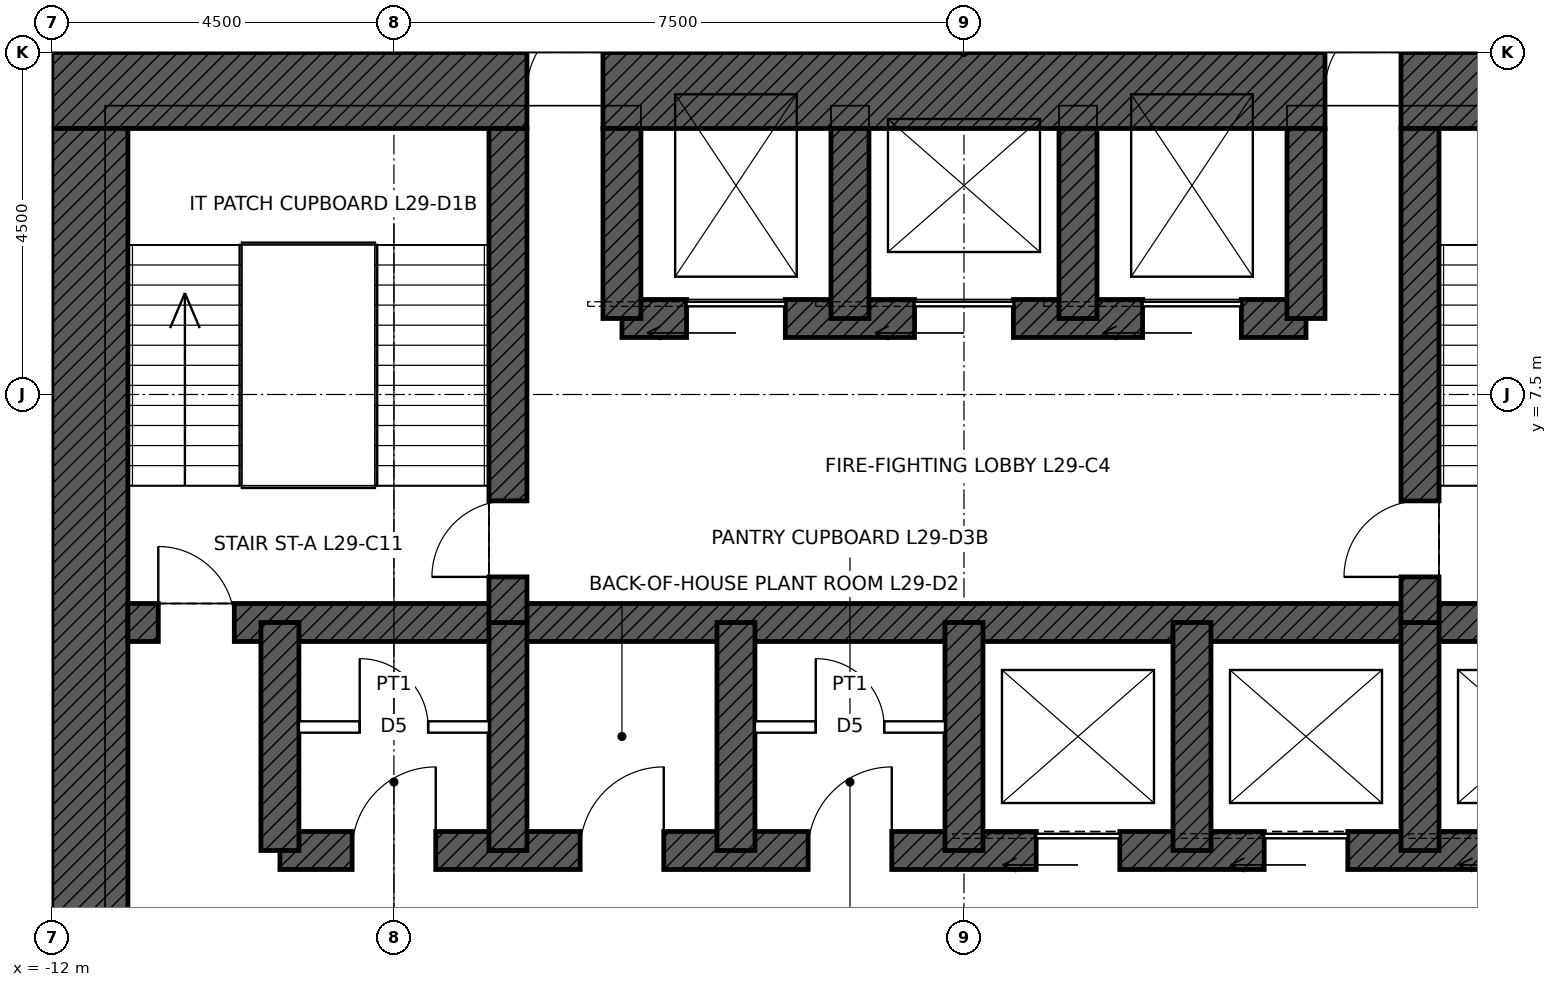
"""IFC4 building model, lengths in metres.
Left out: names, types, materials, properties, quantities, classifications, styles, units other than length and angle.
Written with IfcOpenShell. Run it as: python <this file> out.ifc"""

import sys

from ifc_helpers import new_model, si_unit, direction, frame, frame_2d, origin, place, context, subcontext, project, spatial, rectangle, extrude, element, fill, save


model = new_model("IFC4")
c1 = context("Model", 3, precision=1e-05, world=origin(), true_north=direction((0.0, 1.0)))
c2 = subcontext(c1, "Body", "Model", "MODEL_VIEW")
j1 = project(units=[si_unit("LENGTHUNIT", "METRE"), si_unit("PLANEANGLEUNIT", "RADIAN")], contexts=[c1])
p1 = place(None, origin())
s1 = spatial("IfcSite", under=j1, at=p1, CompositionType="ELEMENT")
p2 = place(p1, origin())
s2 = spatial("IfcBuilding", under=s1, at=p2, CompositionType="ELEMENT")
p3 = place(p2, frame((0.0, 0.0, 144.9)))
s3 = spatial("IfcBuildingStorey", under=s2, at=p3, CompositionType="ELEMENT", Elevation=144.9)
p4 = place(p3, frame((-12.0, 11.5, 0.0), z_axis=(0.0, 0.0, 1.0), x_axis=(1.0, 0.0, 0.0)))
e1 = element("IfcWall", 1, at=p4, inside=s3, PredefinedType="SHEAR", context=c2, shape_type="SweptSolid", body=[
    extrude(rectangle(XDim=24.0, YDim=1.0, at=frame_2d((12.0, 0.0))), origin(), (0.0, 0.0, 1.0), 4.5),
])
p5 = place(p4, frame((6.25, 0.0, 0.0)))
e2 = element("IfcOpeningElement", 2, at=p5, cuts=e1, PredefinedType="OPENING", context=c2, shape_type="SweptSolid", body=[
    extrude(rectangle(XDim=1.0, YDim=2.4, at=frame_2d((0.5, 1.2))), frame((0.0, 0.51, 0.0), z_axis=(0.0, -1.0, 0.0), x_axis=(1.0, 0.0, 0.0)), (0.0, 0.0, 1.0), 1.02),
])
p6 = place(p4, frame((16.75, 0.0, 0.0)))
e3 = element("IfcOpeningElement", 3, at=p6, cuts=e1, PredefinedType="OPENING", context=c2, shape_type="SweptSolid", body=[
    extrude(rectangle(XDim=1.0, YDim=2.4, at=frame_2d((0.5, 1.2))), frame((0.0, 0.51, 0.0), z_axis=(0.0, -1.0, 0.0), x_axis=(1.0, 0.0, 0.0)), (0.0, 0.0, 1.0), 1.02),
])
p7 = place(p3, frame((-11.5, -11.0, 0.0), z_axis=(0.0, 0.0, 1.0), x_axis=(0.0, 1.0, 0.0)))
e4 = element("IfcWall", 4, at=p7, inside=s3, PredefinedType="SHEAR", context=c2, shape_type="SweptSolid", body=[
    extrude(rectangle(XDim=22.0, YDim=1.0, at=frame_2d((11.0, 0.0))), origin(), (0.0, 0.0, 1.0), 4.5),
])
p8 = place(p7, frame((10.5, 0.0, 0.0)))
e5 = element("IfcOpeningElement", 5, at=p8, cuts=e4, PredefinedType="OPENING", context=c2, shape_type="SweptSolid", body=[
    extrude(rectangle(XDim=1.0, YDim=2.4, at=frame_2d((0.5, 1.2))), frame((0.0, 0.51, 0.0), z_axis=(0.0, -1.0, 0.0), x_axis=(1.0, 0.0, 0.0)), (0.0, 0.0, 1.0), 1.02),
])
p9 = place(p3, frame((-11.0, 4.5, 0.0), z_axis=(0.0, 0.0, 1.0), x_axis=(1.0, 0.0, 0.0)))
e6 = element("IfcWall", 6, at=p9, inside=s3, PredefinedType="SHEAR", context=c2, shape_type="SweptSolid", body=[
    extrude(rectangle(XDim=22.0, YDim=0.5, at=frame_2d((11.0, 0.0))), origin(), (0.0, 0.0, 1.0), 4.5),
])
p10 = place(p9, frame((0.4, 0.0, 0.0)))
e7 = element("IfcOpeningElement", 7, at=p10, cuts=e6, PredefinedType="OPENING", context=c2, shape_type="SweptSolid", body=[
    extrude(rectangle(XDim=1.0, YDim=2.1, at=frame_2d((0.5, 1.05))), frame((0.0, 0.26, 0.0), z_axis=(0.0, -1.0, 0.0), x_axis=(1.0, 0.0, 0.0)), (0.0, 0.0, 1.0), 0.52),
])
p11 = place(p9, frame((20.6, 0.0, 0.0)))
e8 = element("IfcOpeningElement", 8, at=p11, cuts=e6, PredefinedType="OPENING", context=c2, shape_type="SweptSolid", body=[
    extrude(rectangle(XDim=1.0, YDim=2.1, at=frame_2d((0.5, 1.05))), frame((0.0, 0.26, 0.0), z_axis=(0.0, -1.0, 0.0), x_axis=(1.0, 0.0, 0.0)), (0.0, 0.0, 1.0), 0.52),
])
p12 = place(p3, frame((-9.0, 1.5, 0.0), z_axis=(0.0, 0.0, 1.0), x_axis=(1.0, 0.0, 0.0)))
e9 = element("IfcWall", 9, at=p12, inside=s3, PredefinedType="SHEAR", context=c2, shape_type="SweptSolid", body=[
    extrude(rectangle(XDim=18.0, YDim=0.5, at=frame_2d((9.0, 0.0))), origin(), (0.0, 0.0, 1.0), 4.5),
])
p13 = place(p12, frame((9.95, 0.0, 0.0)))
e10 = element("IfcOpeningElement", 10, at=p13, cuts=e9, PredefinedType="OPENING", context=c2, shape_type="SweptSolid", body=[
    extrude(rectangle(XDim=1.1, YDim=2.1, at=frame_2d((0.55, 1.05))), frame((0.0, 0.26, 0.0), z_axis=(0.0, -1.0, 0.0), x_axis=(1.0, 0.0, 0.0)), (0.0, 0.0, 1.0), 0.52),
])
p14 = place(p12, frame((12.95, 0.0, 0.0)))
e11 = element("IfcOpeningElement", 11, at=p14, cuts=e9, PredefinedType="OPENING", context=c2, shape_type="SweptSolid", body=[
    extrude(rectangle(XDim=1.1, YDim=2.1, at=frame_2d((0.55, 1.05))), frame((0.0, 0.26, 0.0), z_axis=(0.0, -1.0, 0.0), x_axis=(1.0, 0.0, 0.0)), (0.0, 0.0, 1.0), 0.52),
])
p15 = place(p12, frame((15.95, 0.0, 0.0)))
e12 = element("IfcOpeningElement", 12, at=p15, cuts=e9, PredefinedType="OPENING", context=c2, shape_type="SweptSolid", body=[
    extrude(rectangle(XDim=1.1, YDim=2.1, at=frame_2d((0.55, 1.05))), frame((0.0, 0.26, 0.0), z_axis=(0.0, -1.0, 0.0), x_axis=(1.0, 0.0, 0.0)), (0.0, 0.0, 1.0), 0.52),
])
p16 = place(p12, frame((0.95, 0.0, 0.0)))
e13 = element("IfcOpeningElement", 13, at=p16, cuts=e9, PredefinedType="OPENING", context=c2, shape_type="SweptSolid", body=[
    extrude(rectangle(XDim=1.1, YDim=2.1, at=frame_2d((0.55, 1.05))), frame((0.0, 0.26, 0.0), z_axis=(0.0, -1.0, 0.0), x_axis=(1.0, 0.0, 0.0)), (0.0, 0.0, 1.0), 0.52),
])
p17 = place(p12, frame((3.95, 0.0, 0.0)))
e14 = element("IfcOpeningElement", 14, at=p17, cuts=e9, PredefinedType="OPENING", context=c2, shape_type="SweptSolid", body=[
    extrude(rectangle(XDim=1.1, YDim=2.1, at=frame_2d((0.55, 1.05))), frame((0.0, 0.26, 0.0), z_axis=(0.0, -1.0, 0.0), x_axis=(1.0, 0.0, 0.0)), (0.0, 0.0, 1.0), 0.52),
])
p18 = place(p12, frame((6.95, 0.0, 0.0)))
e15 = element("IfcOpeningElement", 15, at=p18, cuts=e9, PredefinedType="OPENING", context=c2, shape_type="SweptSolid", body=[
    extrude(rectangle(XDim=1.1, YDim=2.1, at=frame_2d((0.55, 1.05))), frame((0.0, 0.26, 0.0), z_axis=(0.0, -1.0, 0.0), x_axis=(1.0, 0.0, 0.0)), (0.0, 0.0, 1.0), 0.52),
])
p19 = place(p3, frame((-4.5, 8.5, 0.0), z_axis=(0.0, 0.0, 1.0), x_axis=(1.0, 0.0, 0.0)))
e16 = element("IfcWall", 16, at=p19, inside=s3, PredefinedType="SHEAR", context=c2, shape_type="SweptSolid", body=[
    extrude(rectangle(XDim=9.0, YDim=0.5, at=frame_2d((4.5, 0.0))), origin(), (0.0, 0.0, 1.0), 4.5),
])
p20 = place(p19, frame((0.85, 0.0, 0.0)))
e17 = element("IfcOpeningElement", 17, at=p20, cuts=e16, PredefinedType="OPENING", context=c2, shape_type="SweptSolid", body=[
    extrude(rectangle(XDim=1.3, YDim=2.4, at=frame_2d((0.65, 1.2))), frame((0.0, 0.26, 0.0), z_axis=(0.0, -1.0, 0.0), x_axis=(1.0, 0.0, 0.0)), (0.0, 0.0, 1.0), 0.52),
])
p21 = place(p19, frame((6.85, 0.0, 0.0)))
e18 = element("IfcOpeningElement", 18, at=p21, cuts=e16, PredefinedType="OPENING", context=c2, shape_type="SweptSolid", body=[
    extrude(rectangle(XDim=1.3, YDim=2.4, at=frame_2d((0.65, 1.2))), frame((0.0, 0.26, 0.0), z_axis=(0.0, -1.0, 0.0), x_axis=(1.0, 0.0, 0.0)), (0.0, 0.0, 1.0), 0.52),
])
p22 = place(p19, frame((3.85, 0.0, 0.0)))
e19 = element("IfcOpeningElement", 19, at=p22, cuts=e16, PredefinedType="OPENING", context=c2, shape_type="SweptSolid", body=[
    extrude(rectangle(XDim=1.3, YDim=2.4, at=frame_2d((0.65, 1.2))), frame((0.0, 0.26, 0.0), z_axis=(0.0, -1.0, 0.0), x_axis=(1.0, 0.0, 0.0)), (0.0, 0.0, 1.0), 0.52),
])
for number, where, z_axis, x_axis in (
    (20, (-9.0, 1.5, 0.0), (0.0, 0.0, 1.0), (0.0, 1.0, 0.0)),
    (21, (-6.0, 1.5, 0.0), (0.0, 0.0, 1.0), (0.0, 1.0, 0.0)),
    (22, (-3.0, 1.5, 0.0), (0.0, 0.0, 1.0), (0.0, 1.0, 0.0)),
    (23, (0.0, 1.5, 0.0), (0.0, 0.0, 1.0), (0.0, 1.0, 0.0)),
    (24, (3.0, 1.5, 0.0), (0.0, 0.0, 1.0), (0.0, 1.0, 0.0)),
    (25, (6.0, 1.5, 0.0), (0.0, 0.0, 1.0), (0.0, 1.0, 0.0)),
):
    element("IfcWall", number, at=place(p3, frame(where, z_axis=z_axis, x_axis=x_axis)), inside=s3, PredefinedType="SHEAR", context=c2, shape_type="SweptSolid", body=[
        extrude(rectangle(XDim=3.0, YDim=0.5, at=frame_2d((1.5, 0.0))), origin(), (0.0, 0.0, 1.0), 4.5),
    ])
p23 = place(p3, frame((-6.0, 4.5, 0.0), z_axis=(0.0, 0.0, 1.0), x_axis=(0.0, 1.0, 0.0)))
e26 = element("IfcWall", 26, at=p23, inside=s3, PredefinedType="SHEAR", context=c2, shape_type="SweptSolid", body=[
    extrude(rectangle(XDim=6.5, YDim=0.5, at=frame_2d((3.25, 0.0))), origin(), (0.0, 0.0, 1.0), 4.5),
])
p24 = place(p23, frame((0.6, 0.0, 0.0)))
e27 = element("IfcOpeningElement", 27, at=p24, cuts=e26, PredefinedType="OPENING", context=c2, shape_type="SweptSolid", body=[
    extrude(rectangle(XDim=1.0, YDim=2.1, at=frame_2d((0.5, 1.05))), frame((0.0, 0.26, 0.0), z_axis=(0.0, -1.0, 0.0), x_axis=(1.0, 0.0, 0.0)), (0.0, 0.0, 1.0), 0.52),
])
p25 = place(p3, frame((6.0, 4.5, 0.0), z_axis=(0.0, 0.0, 1.0), x_axis=(0.0, 1.0, 0.0)))
e28 = element("IfcWall", 28, at=p25, inside=s3, PredefinedType="SHEAR", context=c2, shape_type="SweptSolid", body=[
    extrude(rectangle(XDim=6.5, YDim=0.5, at=frame_2d((3.25, 0.0))), origin(), (0.0, 0.0, 1.0), 4.5),
])
p26 = place(p25, frame((0.6, 0.0, 0.0)))
e29 = element("IfcOpeningElement", 29, at=p26, cuts=e28, PredefinedType="OPENING", context=c2, shape_type="SweptSolid", body=[
    extrude(rectangle(XDim=1.0, YDim=2.1, at=frame_2d((0.5, 1.05))), frame((0.0, 0.26, 0.0), z_axis=(0.0, -1.0, 0.0), x_axis=(1.0, 0.0, 0.0)), (0.0, 0.0, 1.0), 0.52),
])
for number, where, z_axis, x_axis in (
    (30, (-4.5, 8.5, 0.0), (0.0, 0.0, 1.0), (0.0, 1.0, 0.0)),
    (31, (4.5, 8.5, 0.0), (0.0, 0.0, 1.0), (0.0, 1.0, 0.0)),
    (32, (-1.5, 8.5, 0.0), (0.0, 0.0, 1.0), (0.0, 1.0, 0.0)),
    (33, (1.5, 8.5, 0.0), (0.0, 0.0, 1.0), (0.0, 1.0, 0.0)),
):
    element("IfcWall", number, at=place(p3, frame(where, z_axis=z_axis, x_axis=x_axis)), inside=s3, PredefinedType="SHEAR", context=c2, shape_type="SweptSolid", body=[
        extrude(rectangle(XDim=2.5, YDim=0.5, at=frame_2d((1.25, 0.0))), origin(), (0.0, 0.0, 1.0), 4.5),
    ])
p27 = place(p3, frame((-14.075, 12.0, 0.0), z_axis=(0.0, 0.0, 1.0), x_axis=(1.0, 0.0, 0.0)))
e34 = element("IfcWall", 34, at=p27, inside=s3, PredefinedType="PARTITIONING", context=c2, shape_type="SweptSolid", body=[
    extrude(rectangle(XDim=2.075, YDim=0.15, at=frame_2d((1.038, 0.0))), origin(), (0.0, 0.0, 1.0), 4.3),
])
p28 = place(p27, frame((0.575, 0.0, 0.0)))
e35 = element("IfcOpeningElement", 35, at=p28, cuts=e34, PredefinedType="OPENING", context=c2, shape_type="SweptSolid", body=[
    extrude(rectangle(XDim=1.0, YDim=2.1, at=frame_2d((0.5, 1.05))), frame((0.0, 0.085, 0.0), z_axis=(0.0, -1.0, 0.0), x_axis=(1.0, 0.0, 0.0)), (0.0, 0.0, 1.0), 0.17),
])
p29 = place(p3, frame((-11.25, 12.0, 0.0), z_axis=(0.0, 0.0, 1.0), x_axis=(0.0, 1.0, 0.0)))
e36 = element("IfcWall", 36, at=p29, inside=s3, PredefinedType="PARTITIONING", context=c2, shape_type="SweptSolid", body=[
    extrude(rectangle(XDim=11.55, YDim=0.15, at=frame_2d((5.775, 0.0))), origin(), (0.0, 0.0, 1.0), 3.431),
])
p30 = place(p3, frame((0.0, 12.0, 0.0), z_axis=(0.0, 0.0, 1.0), x_axis=(0.0, 1.0, 0.0)))
e37 = element("IfcWall", 37, at=p30, inside=s3, PredefinedType="PARTITIONING", context=c2, shape_type="SweptSolid", body=[
    extrude(rectangle(XDim=10.39, YDim=0.15, at=frame_2d((5.195, 0.0))), origin(), (0.0, 0.0, 1.0), 3.431),
])
p31 = place(p3, frame((-8.75, 3.125, 0.0), z_axis=(0.0, 0.0, 1.0), x_axis=(1.0, 0.0, 0.0)))
e38 = element("IfcWall", 38, at=p31, inside=s3, PredefinedType="PARTITIONING", context=c2, shape_type="SweptSolid", body=[
    extrude(rectangle(XDim=2.5, YDim=0.15, at=frame_2d((1.25, 0.0))), origin(), (0.0, 0.0, 1.0), 4.25),
])
p32 = place(p31, frame((0.8, 0.0, 0.0)))
e39 = element("IfcOpeningElement", 39, at=p32, cuts=e38, PredefinedType="OPENING", context=c2, shape_type="SweptSolid", body=[
    extrude(rectangle(XDim=0.9, YDim=2.1, at=frame_2d((0.45, 1.05))), frame((0.0, 0.085, 0.0), z_axis=(0.0, -1.0, 0.0), x_axis=(1.0, 0.0, 0.0)), (0.0, 0.0, 1.0), 0.17),
])
p33 = place(p3, frame((-2.75, 3.125, 0.0), z_axis=(0.0, 0.0, 1.0), x_axis=(1.0, 0.0, 0.0)))
e40 = element("IfcWall", 40, at=p33, inside=s3, PredefinedType="PARTITIONING", context=c2, shape_type="SweptSolid", body=[
    extrude(rectangle(XDim=2.5, YDim=0.15, at=frame_2d((1.25, 0.0))), origin(), (0.0, 0.0, 1.0), 4.25),
])
p34 = place(p33, frame((0.8, 0.0, 0.0)))
e41 = element("IfcOpeningElement", 41, at=p34, cuts=e40, PredefinedType="OPENING", context=c2, shape_type="SweptSolid", body=[
    extrude(rectangle(XDim=0.9, YDim=2.1, at=frame_2d((0.45, 1.05))), frame((0.0, 0.085, 0.0), z_axis=(0.0, -1.0, 0.0), x_axis=(1.0, 0.0, 0.0)), (0.0, 0.0, 1.0), 0.17),
])
p35 = place(p10, origin())
e42 = element("IfcDoor", 42, at=p35, inside=s3, OperationType="SINGLE_SWING_LEFT", PredefinedType="DOOR", context=c2, shape_type="SweptSolid", body=[
    extrude(rectangle(XDim=1.0, YDim=2.1, at=frame_2d((0.5, 1.05))), frame((0.0, 0.025, 0.0), z_axis=(0.0, -1.0, 0.0), x_axis=(1.0, 0.0, 0.0)), (0.0, 0.0, 1.0), 0.05),
])
fill(e7, e42)
p36 = place(p24, origin())
e43 = element("IfcDoor", 43, at=p36, inside=s3, OperationType="SINGLE_SWING_LEFT", PredefinedType="DOOR", context=c2, shape_type="SweptSolid", body=[
    extrude(rectangle(XDim=1.0, YDim=2.1, at=frame_2d((0.5, 1.05))), frame((0.0, 0.025, 0.0), z_axis=(0.0, -1.0, 0.0), x_axis=(1.0, 0.0, 0.0)), (0.0, 0.0, 1.0), 0.05),
])
fill(e27, e43)
p37 = place(p26, origin())
e44 = element("IfcDoor", 44, at=p37, inside=s3, OperationType="SINGLE_SWING_LEFT", PredefinedType="DOOR", context=c2, shape_type="SweptSolid", body=[
    extrude(rectangle(XDim=1.0, YDim=2.1, at=frame_2d((0.5, 1.05))), frame((0.0, 0.025, 0.0), z_axis=(0.0, -1.0, 0.0), x_axis=(1.0, 0.0, 0.0)), (0.0, 0.0, 1.0), 0.05),
])
fill(e29, e44)
p38 = place(p5, origin())
e45 = element("IfcDoor", 45, at=p38, inside=s3, OperationType="SINGLE_SWING_RIGHT", PredefinedType="DOOR", context=c2, shape_type="SweptSolid", body=[
    extrude(rectangle(XDim=1.0, YDim=2.4, at=frame_2d((0.5, 1.2))), frame((0.0, 0.485, 0.0), z_axis=(0.0, -1.0, 0.0), x_axis=(1.0, 0.0, 0.0)), (0.0, 0.0, 1.0), 0.05),
])
fill(e2, e45)
p39 = place(p6, origin())
e46 = element("IfcDoor", 46, at=p39, inside=s3, OperationType="SINGLE_SWING_RIGHT", PredefinedType="DOOR", context=c2, shape_type="SweptSolid", body=[
    extrude(rectangle(XDim=1.0, YDim=2.4, at=frame_2d((0.5, 1.2))), frame((0.0, 0.485, 0.0), z_axis=(0.0, -1.0, 0.0), x_axis=(1.0, 0.0, 0.0)), (0.0, 0.0, 1.0), 0.05),
])
fill(e3, e46)
p40 = place(p20, origin())
e47 = element("IfcDoor", 47, at=p40, inside=s3, OperationType="SLIDING_TO_LEFT", PredefinedType="DOOR", context=c2, shape_type="SweptSolid", body=[
    extrude(rectangle(XDim=1.3, YDim=2.4, at=frame_2d((0.65, 1.2))), frame((0.0, 0.025, 0.0), z_axis=(0.0, -1.0, 0.0), x_axis=(1.0, 0.0, 0.0)), (0.0, 0.0, 1.0), 0.05),
])
fill(e17, e47)
p41 = place(p21, origin())
e48 = element("IfcDoor", 48, at=p41, inside=s3, OperationType="SLIDING_TO_LEFT", PredefinedType="DOOR", context=c2, shape_type="SweptSolid", body=[
    extrude(rectangle(XDim=1.3, YDim=2.4, at=frame_2d((0.65, 1.2))), frame((0.0, 0.025, 0.0), z_axis=(0.0, -1.0, 0.0), x_axis=(1.0, 0.0, 0.0)), (0.0, 0.0, 1.0), 0.05),
])
fill(e18, e48)
p42 = place(p22, origin())
e49 = element("IfcDoor", 49, at=p42, inside=s3, OperationType="SLIDING_TO_LEFT", PredefinedType="DOOR", context=c2, shape_type="SweptSolid", body=[
    extrude(rectangle(XDim=1.3, YDim=2.4, at=frame_2d((0.65, 1.2))), frame((0.0, 0.025, 0.0), z_axis=(0.0, -1.0, 0.0), x_axis=(1.0, 0.0, 0.0)), (0.0, 0.0, 1.0), 0.05),
])
fill(e19, e49)
p43 = place(p13, origin())
e50 = element("IfcDoor", 50, at=p43, inside=s3, OperationType="SLIDING_TO_LEFT", PredefinedType="DOOR", context=c2, shape_type="SweptSolid", body=[
    extrude(rectangle(XDim=1.1, YDim=2.1, at=frame_2d((0.55, 1.05))), frame((0.0, 0.025, 0.0), z_axis=(0.0, -1.0, 0.0), x_axis=(1.0, 0.0, 0.0)), (0.0, 0.0, 1.0), 0.05),
])
fill(e10, e50)
p44 = place(p14, origin())
e51 = element("IfcDoor", 51, at=p44, inside=s3, OperationType="SLIDING_TO_LEFT", PredefinedType="DOOR", context=c2, shape_type="SweptSolid", body=[
    extrude(rectangle(XDim=1.1, YDim=2.1, at=frame_2d((0.55, 1.05))), frame((0.0, 0.025, 0.0), z_axis=(0.0, -1.0, 0.0), x_axis=(1.0, 0.0, 0.0)), (0.0, 0.0, 1.0), 0.05),
])
fill(e11, e51)
p45 = place(p16, origin())
e52 = element("IfcDoor", 52, at=p45, inside=s3, OperationType="SINGLE_SWING_RIGHT", PredefinedType="DOOR", context=c2, shape_type="SweptSolid", body=[
    extrude(rectangle(XDim=1.1, YDim=2.1, at=frame_2d((0.55, 1.05))), frame((0.0, 0.025, 0.0), z_axis=(0.0, -1.0, 0.0), x_axis=(1.0, 0.0, 0.0)), (0.0, 0.0, 1.0), 0.05),
])
fill(e13, e52)
p46 = place(p32, origin())
e53 = element("IfcDoor", 53, at=p46, inside=s3, OperationType="SINGLE_SWING_LEFT", PredefinedType="DOOR", context=c2, shape_type="SweptSolid", body=[
    extrude(rectangle(XDim=0.9, YDim=2.1, at=frame_2d((0.45, 1.05))), frame((0.0, 0.025, 0.0), z_axis=(0.0, -1.0, 0.0), x_axis=(1.0, 0.0, 0.0)), (0.0, 0.0, 1.0), 0.05),
])
fill(e39, e53)
p47 = place(p17, origin())
e54 = element("IfcDoor", 54, at=p47, inside=s3, OperationType="SINGLE_SWING_RIGHT", PredefinedType="DOOR", context=c2, shape_type="SweptSolid", body=[
    extrude(rectangle(XDim=1.1, YDim=2.1, at=frame_2d((0.55, 1.05))), frame((0.0, 0.025, 0.0), z_axis=(0.0, -1.0, 0.0), x_axis=(1.0, 0.0, 0.0)), (0.0, 0.0, 1.0), 0.05),
])
fill(e14, e54)
p48 = place(p18, origin())
e55 = element("IfcDoor", 55, at=p48, inside=s3, OperationType="SINGLE_SWING_RIGHT", PredefinedType="DOOR", context=c2, shape_type="SweptSolid", body=[
    extrude(rectangle(XDim=1.1, YDim=2.1, at=frame_2d((0.55, 1.05))), frame((0.0, 0.025, 0.0), z_axis=(0.0, -1.0, 0.0), x_axis=(1.0, 0.0, 0.0)), (0.0, 0.0, 1.0), 0.05),
])
fill(e15, e55)
p49 = place(p34, origin())
e56 = element("IfcDoor", 56, at=p49, inside=s3, OperationType="SINGLE_SWING_LEFT", PredefinedType="DOOR", context=c2, shape_type="SweptSolid", body=[
    extrude(rectangle(XDim=0.9, YDim=2.1, at=frame_2d((0.45, 1.05))), frame((0.0, 0.025, 0.0), z_axis=(0.0, -1.0, 0.0), x_axis=(1.0, 0.0, 0.0)), (0.0, 0.0, 1.0), 0.05),
])
fill(e41, e56)
save(model, sys.argv[1])
